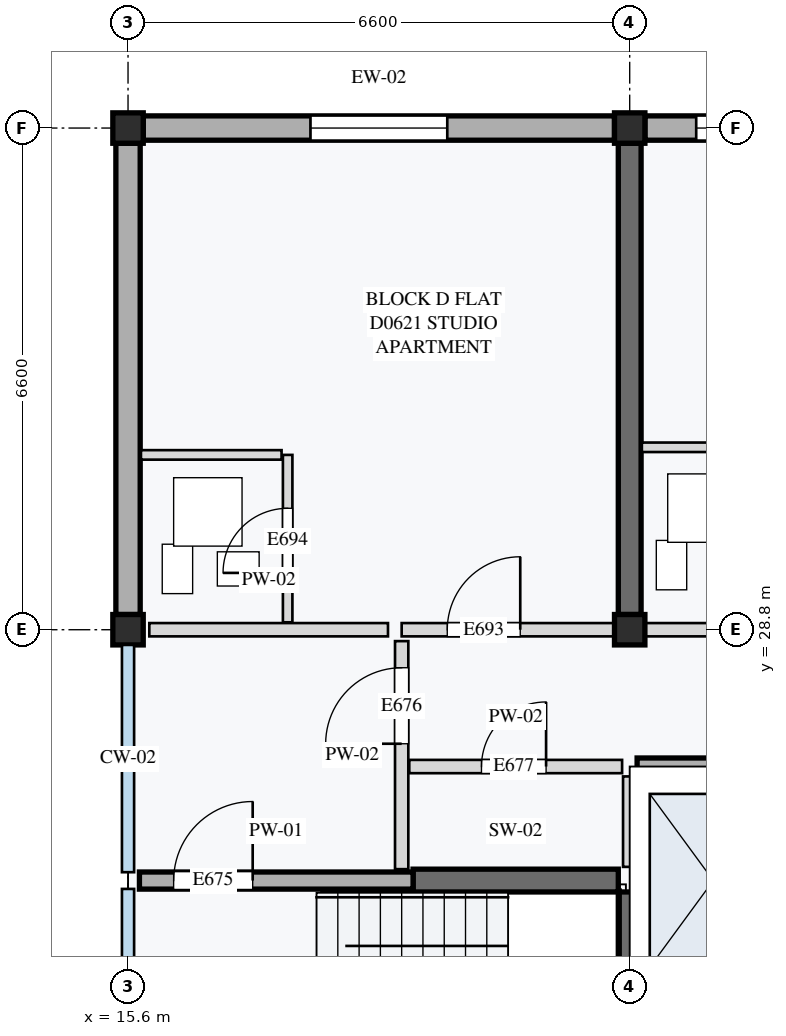
"""IFC4 building model, lengths in metres.
Left out: names, types, materials, properties, quantities, classifications, styles, units other than length and angle.
Written with IfcOpenShell. Run it as: python <this file> out.ifc"""

import sys

from ifc_helpers import new_model, si_unit, direction, frame, frame_2d, origin, origin_2d, place, context, subcontext, project, spatial, rectangle, extrude, element, fill, save


model = new_model("IFC4")
c1 = context("Model", 3, precision=1e-05, world=origin(), true_north=direction((0.0, 1.0)))
c2 = subcontext(c1, "Body", "Model", "MODEL_VIEW")
j1 = project(units=[si_unit("LENGTHUNIT", "METRE"), si_unit("PLANEANGLEUNIT", "RADIAN")], contexts=[c1])
p1 = place(None, origin())
s1 = spatial("IfcSite", under=j1, at=p1, CompositionType="ELEMENT")
p2 = place(p1, origin())
s2 = spatial("IfcBuilding", under=s1, at=p2, CompositionType="ELEMENT")
p3 = place(p2, frame((0.0, 0.0, 21.2)))
s3 = spatial("IfcBuildingStorey", under=s2, at=p3, CompositionType="ELEMENT", Elevation=21.2)
for number, where, z_axis, x_axis in (
    (1, (15.6, 28.8, 0.0), (0.0, 0.0, 1.0), (1.0, 0.0, 0.0)),
    (2, (15.6, 35.4, 0.0), (0.0, 0.0, 1.0), (1.0, 0.0, 0.0)),
    (3, (22.2, 28.8, 0.0), (0.0, 0.0, 1.0), (1.0, 0.0, 0.0)),
    (4, (22.2, 35.4, 0.0), (0.0, 0.0, 1.0), (1.0, 0.0, 0.0)),
):
    element("IfcColumn", number, at=place(p3, frame(where, z_axis=z_axis, x_axis=x_axis)), inside=s3, PredefinedType="COLUMN", context=c2, shape_type="SweptSolid", body=[
        extrude(rectangle(XDim=0.4, YDim=0.4, at=origin_2d()), origin(), (0.0, 0.0, 1.0), 3.2),
    ])
p4 = place(p3, frame((19.35, 25.5, 0.0), z_axis=(0.0, 0.0, 1.0), x_axis=(1.0, 0.0, 0.0)))
e5 = element("IfcWall", 5, at=p4, inside=s3, PredefinedType="SHEAR", context=c2, shape_type="SweptSolid", body=[
    extrude(rectangle(XDim=2.7, YDim=0.3, at=frame_2d((1.35, 0.0))), origin(), (0.0, 0.0, 1.0), 2.96),
])
p5 = place(p3, frame((22.2, 22.55, 0.0), z_axis=(0.0, 0.0, 1.0), x_axis=(0.0, 1.0, 0.0)))
e6 = element("IfcWall", 6, at=p5, inside=s3, PredefinedType="SHEAR", context=c2, shape_type="SweptSolid", body=[
    extrude(rectangle(XDim=2.8, YDim=0.3, at=frame_2d((1.4, 0.0))), origin(), (0.0, 0.0, 1.0), 2.96),
])
p6 = place(p3, frame((22.2, 29.0, 0.0), z_axis=(0.0, 0.0, 1.0), x_axis=(0.0, 1.0, 0.0)))
e7 = element("IfcWall", 7, at=p6, inside=s3, PredefinedType="SHEAR", context=c2, shape_type="SweptSolid", body=[
    extrude(rectangle(XDim=6.2, YDim=0.3, at=frame_2d((3.1, 0.0))), origin(), (0.0, 0.0, 1.0), 2.96),
])
p7 = place(p3, frame((15.8, 35.4, 0.0), z_axis=(0.0, 0.0, 1.0), x_axis=(1.0, 0.0, 0.0)))
e8 = element("IfcWall", 8, at=p7, inside=s3, PredefinedType="STANDARD", context=c2, shape_type="SweptSolid", body=[
    extrude(rectangle(XDim=6.2, YDim=0.32, at=frame_2d((3.1, 0.0))), origin(), (0.0, 0.0, 1.0), 2.6),
])
p8 = place(p7, frame((2.2, 0.0, 0.85)))
e9 = element("IfcOpeningElement", 9, at=p8, cuts=e8, PredefinedType="OPENING", context=c2, shape_type="SweptSolid", body=[
    extrude(rectangle(XDim=1.8, YDim=1.35, at=frame_2d((0.9, 0.675))), frame((0.0, 0.17, 0.0), z_axis=(0.0, -1.0, 0.0), x_axis=(1.0, 0.0, 0.0)), (0.0, 0.0, 1.0), 0.34),
])
p9 = place(p3, frame((22.4, 35.4, 0.0), z_axis=(0.0, 0.0, 1.0), x_axis=(1.0, 0.0, 0.0)))
e10 = element("IfcWall", 10, at=p9, inside=s3, PredefinedType="STANDARD", context=c2, shape_type="SweptSolid", body=[
    extrude(rectangle(XDim=6.2, YDim=0.32, at=frame_2d((3.1, 0.0))), origin(), (0.0, 0.0, 1.0), 2.6),
])
p10 = place(p9, frame((0.675, 0.0, 0.85)))
e11 = element("IfcOpeningElement", 11, at=p10, cuts=e10, PredefinedType="OPENING", context=c2, shape_type="SweptSolid", body=[
    extrude(rectangle(XDim=1.8, YDim=1.35, at=frame_2d((0.9, 0.675))), frame((0.0, 0.17, 0.0), z_axis=(0.0, -1.0, 0.0), x_axis=(1.0, 0.0, 0.0)), (0.0, 0.0, 1.0), 0.34),
])
p11 = place(p9, frame((4.1, 0.0, 0.85)))
e12 = element("IfcOpeningElement", 12, at=p11, cuts=e10, PredefinedType="OPENING", context=c2, shape_type="SweptSolid", body=[
    extrude(rectangle(XDim=1.5, YDim=1.35, at=frame_2d((0.75, 0.675))), frame((0.0, 0.17, 0.0), z_axis=(0.0, -1.0, 0.0), x_axis=(1.0, 0.0, 0.0)), (0.0, 0.0, 1.0), 0.34),
])
p12 = place(p3, frame((15.6, 29.0, 0.0), z_axis=(0.0, 0.0, 1.0), x_axis=(0.0, 1.0, 0.0)))
e13 = element("IfcWall", 13, at=p12, inside=s3, PredefinedType="STANDARD", context=c2, shape_type="SweptSolid", body=[
    extrude(rectangle(XDim=6.2, YDim=0.32, at=frame_2d((3.1, 0.0))), origin(), (0.0, 0.0, 1.0), 2.65),
])
p13 = place(p3, frame((15.75, 25.5, 0.0), z_axis=(0.0, 0.0, 1.0), x_axis=(1.0, 0.0, 0.0)))
e14 = element("IfcWall", 14, at=p13, inside=s3, PredefinedType="STANDARD", context=c2, shape_type="SweptSolid", body=[
    extrude(rectangle(XDim=3.6, YDim=0.225, at=frame_2d((1.8, 0.0))), origin(), (0.0, 0.0, 1.0), 2.96),
])
p14 = place(p13, frame((0.45, 0.0, 0.0)))
e15 = element("IfcOpeningElement", 15, at=p14, cuts=e14, PredefinedType="OPENING", context=c2, shape_type="SweptSolid", body=[
    extrude(rectangle(XDim=1.04, YDim=2.12, at=frame_2d((0.52, 1.06))), frame((0.0, 0.123, 0.0), z_axis=(0.0, -1.0, 0.0), x_axis=(1.0, 0.0, 0.0)), (0.0, 0.0, 1.0), 0.245),
])
p15 = place(p3, frame((19.2, 25.65, 0.0), z_axis=(0.0, 0.0, 1.0), x_axis=(0.0, 1.0, 0.0)))
e16 = element("IfcWall", 16, at=p15, inside=s3, PredefinedType="PARTITIONING", context=c2, shape_type="SweptSolid", body=[
    extrude(rectangle(XDim=3.0, YDim=0.175, at=frame_2d((1.5, 0.0))), origin(), (0.0, 0.0, 1.0), 2.96),
])
p16 = place(p15, frame((1.65, 0.0, 0.0)))
e17 = element("IfcOpeningElement", 17, at=p16, cuts=e16, PredefinedType="OPENING", context=c2, shape_type="SweptSolid", body=[
    extrude(rectangle(XDim=1.0, YDim=2.1, at=frame_2d((0.5, 1.05))), frame((0.0, 0.097, 0.0), z_axis=(0.0, -1.0, 0.0), x_axis=(1.0, 0.0, 0.0)), (0.0, 0.0, 1.0), 0.195),
])
p17 = place(p3, frame((19.3, 27.0, 0.0), z_axis=(0.0, 0.0, 1.0), x_axis=(1.0, 0.0, 0.0)))
e18 = element("IfcWall", 18, at=p17, inside=s3, PredefinedType="PARTITIONING", context=c2, shape_type="SweptSolid", body=[
    extrude(rectangle(XDim=2.8, YDim=0.175, at=frame_2d((1.4, 0.0))), origin(), (0.0, 0.0, 1.0), 2.96),
])
p18 = place(p17, frame((0.95, 0.0, 0.0)))
e19 = element("IfcOpeningElement", 19, at=p18, cuts=e18, PredefinedType="OPENING", context=c2, shape_type="SweptSolid", body=[
    extrude(rectangle(XDim=0.85, YDim=2.0, at=frame_2d((0.425, 1.0))), frame((0.0, 0.097, 0.0), z_axis=(0.0, -1.0, 0.0), x_axis=(1.0, 0.0, 0.0)), (0.0, 0.0, 1.0), 0.195),
])
p19 = place(p3, frame((22.2, 25.68, 0.0), z_axis=(0.0, 0.0, 1.0), x_axis=(0.0, 1.0, 0.0)))
e20 = element("IfcWall", 20, at=p19, inside=s3, PredefinedType="PARTITIONING", context=c2, shape_type="SweptSolid", body=[
    extrude(rectangle(XDim=1.19, YDim=0.175, at=frame_2d((0.595, 0.0))), origin(), (0.0, 0.0, 1.0), 2.96),
])
p20 = place(p3, frame((22.298, 27.0, 0.0), z_axis=(0.0, 0.0, 1.0), x_axis=(1.0, 0.0, 0.0)))
e21 = element("IfcWall", 21, at=p20, inside=s3, PredefinedType="STANDARD", context=c2, shape_type="SweptSolid", body=[
    extrude(rectangle(XDim=4.022, YDim=0.225, at=frame_2d((2.011, 0.0))), origin(), (0.0, 0.0, 1.0), 2.96),
])
p21 = place(p3, frame((15.88, 28.8, 0.0), z_axis=(0.0, 0.0, 1.0), x_axis=(1.0, 0.0, 0.0)))
e22 = element("IfcWall", 22, at=p21, inside=s3, PredefinedType="PARTITIONING", context=c2, shape_type="SweptSolid", body=[
    extrude(rectangle(XDim=3.14, YDim=0.175, at=frame_2d((1.57, 0.0))), origin(), (0.0, 0.0, 1.0), 2.55),
])
p22 = place(p3, frame((19.2, 28.8, 0.0), z_axis=(0.0, 0.0, 1.0), x_axis=(1.0, 0.0, 0.0)))
e23 = element("IfcWall", 23, at=p22, inside=s3, PredefinedType="PARTITIONING", context=c2, shape_type="SweptSolid", body=[
    extrude(rectangle(XDim=3.0, YDim=0.175, at=frame_2d((1.5, 0.0))), origin(), (0.0, 0.0, 1.0), 2.55),
])
p23 = place(p22, frame((0.6, 0.0, 0.0)))
e24 = element("IfcOpeningElement", 24, at=p23, cuts=e23, PredefinedType="OPENING", context=c2, shape_type="SweptSolid", body=[
    extrude(rectangle(XDim=0.96, YDim=2.18, at=frame_2d((0.48, 1.09))), frame((0.0, 0.097, 0.0), z_axis=(0.0, -1.0, 0.0), x_axis=(1.0, 0.0, 0.0)), (0.0, 0.0, 1.0), 0.195),
])
p24 = place(p3, frame((17.7, 28.897, 0.0), z_axis=(0.0, 0.0, 1.0), x_axis=(0.0, 1.0, 0.0)))
e25 = element("IfcWall", 25, at=p24, inside=s3, PredefinedType="PARTITIONING", context=c2, shape_type="SweptSolid", body=[
    extrude(rectangle(XDim=2.203, YDim=0.125, at=frame_2d((1.101, 0.0))), origin(), (0.0, 0.0, 1.0), 2.96),
])
p25 = place(p24, frame((0.65, 0.0, 0.0)))
e26 = element("IfcOpeningElement", 26, at=p25, cuts=e25, PredefinedType="OPENING", context=c2, shape_type="SweptSolid", body=[
    extrude(rectangle(XDim=0.85, YDim=2.04, at=frame_2d((0.425, 1.02))), frame((0.0, 0.073, 0.0), z_axis=(0.0, -1.0, 0.0), x_axis=(1.0, 0.0, 0.0)), (0.0, 0.0, 1.0), 0.145),
])
p26 = place(p3, frame((15.77, 31.1, 0.0), z_axis=(0.0, 0.0, 1.0), x_axis=(1.0, 0.0, 0.0)))
e27 = element("IfcWall", 27, at=p26, inside=s3, PredefinedType="PARTITIONING", context=c2, shape_type="SweptSolid", body=[
    extrude(rectangle(XDim=1.85, YDim=0.125, at=frame_2d((0.925, 0.0))), origin(), (0.0, 0.0, 1.0), 2.96),
])
p27 = place(p3, frame((22.2, 28.8, 0.0), z_axis=(0.0, 0.0, 1.0), x_axis=(1.0, 0.0, 0.0)))
e28 = element("IfcWall", 28, at=p27, inside=s3, PredefinedType="PARTITIONING", context=c2, shape_type="SweptSolid", body=[
    extrude(rectangle(XDim=6.6, YDim=0.175, at=frame_2d((3.3, 0.0))), origin(), (0.0, 0.0, 1.0), 2.55),
])
p28 = place(p27, frame((3.85, 0.0, 0.0)))
e29 = element("IfcOpeningElement", 29, at=p28, cuts=e28, PredefinedType="OPENING", context=c2, shape_type="SweptSolid", body=[
    extrude(rectangle(XDim=0.95, YDim=2.16, at=frame_2d((0.475, 1.08))), frame((0.0, 0.097, 0.0), z_axis=(0.0, -1.0, 0.0), x_axis=(1.0, 0.0, 0.0)), (0.0, 0.0, 1.0), 0.195),
])
p29 = place(p3, frame((22.36, 31.2, 0.0), z_axis=(0.0, 0.0, 1.0), x_axis=(1.0, 0.0, 0.0)))
e30 = element("IfcWall", 30, at=p29, inside=s3, PredefinedType="PARTITIONING", context=c2, shape_type="SweptSolid", body=[
    extrude(rectangle(XDim=1.66, YDim=0.125, at=frame_2d((0.83, 0.0))), origin(), (0.0, 0.0, 1.0), 2.96),
])
p30 = place(p8, origin())
e31 = element("IfcWindow", 31, at=p30, inside=s3, PartitioningType="SINGLE_PANEL", PredefinedType="WINDOW", context=c2, shape_type="SweptSolid", body=[
    extrude(rectangle(XDim=1.8, YDim=1.35, at=frame_2d((0.9, 0.675))), frame((0.0, 0.03, 0.0), z_axis=(0.0, -1.0, 0.0), x_axis=(1.0, 0.0, 0.0)), (0.0, 0.0, 1.0), 0.06),
])
fill(e9, e31)
p31 = place(p10, origin())
e32 = element("IfcWindow", 32, at=p31, inside=s3, PartitioningType="SINGLE_PANEL", PredefinedType="WINDOW", context=c2, shape_type="SweptSolid", body=[
    extrude(rectangle(XDim=1.8, YDim=1.35, at=frame_2d((0.9, 0.675))), frame((0.0, 0.03, 0.0), z_axis=(0.0, -1.0, 0.0), x_axis=(1.0, 0.0, 0.0)), (0.0, 0.0, 1.0), 0.06),
])
fill(e11, e32)
p32 = place(p14, origin())
e33 = element("IfcDoor", 33, at=p32, inside=s3, OperationType="SINGLE_SWING_RIGHT", PredefinedType="DOOR", context=c2, shape_type="SweptSolid", body=[
    extrude(rectangle(XDim=1.04, YDim=2.12, at=frame_2d((0.52, 1.06))), frame((0.0, 0.025, 0.0), z_axis=(0.0, -1.0, 0.0), x_axis=(1.0, 0.0, 0.0)), (0.0, 0.0, 1.0), 0.05),
])
fill(e15, e33)
p33 = place(p16, origin())
e34 = element("IfcDoor", 34, at=p33, inside=s3, OperationType="SINGLE_SWING_LEFT", PredefinedType="DOOR", context=c2, shape_type="SweptSolid", body=[
    extrude(rectangle(XDim=1.0, YDim=2.1, at=frame_2d((0.5, 1.05))), frame((0.0, 0.025, 0.0), z_axis=(0.0, -1.0, 0.0), x_axis=(1.0, 0.0, 0.0)), (0.0, 0.0, 1.0), 0.05),
])
fill(e17, e34)
p34 = place(p18, origin())
e35 = element("IfcDoor", 35, at=p34, inside=s3, OperationType="SINGLE_SWING_RIGHT", PredefinedType="DOOR", context=c2, shape_type="SweptSolid", body=[
    extrude(rectangle(XDim=0.85, YDim=2.0, at=frame_2d((0.425, 1.0))), frame((0.0, 0.025, 0.0), z_axis=(0.0, -1.0, 0.0), x_axis=(1.0, 0.0, 0.0)), (0.0, 0.0, 1.0), 0.05),
])
fill(e19, e35)
p35 = place(p23, origin())
e36 = element("IfcDoor", 36, at=p35, inside=s3, OperationType="SINGLE_SWING_RIGHT", PredefinedType="DOOR", context=c2, shape_type="SweptSolid", body=[
    extrude(rectangle(XDim=0.96, YDim=2.18, at=frame_2d((0.48, 1.09))), frame((0.0, 0.025, 0.0), z_axis=(0.0, -1.0, 0.0), x_axis=(1.0, 0.0, 0.0)), (0.0, 0.0, 1.0), 0.05),
])
fill(e24, e36)
p36 = place(p25, origin())
e37 = element("IfcDoor", 37, at=p36, inside=s3, OperationType="SINGLE_SWING_LEFT", PredefinedType="DOOR", context=c2, shape_type="SweptSolid", body=[
    extrude(rectangle(XDim=0.85, YDim=2.04, at=frame_2d((0.425, 1.02))), frame((0.0, 0.025, 0.0), z_axis=(0.0, -1.0, 0.0), x_axis=(1.0, 0.0, 0.0)), (0.0, 0.0, 1.0), 0.05),
])
fill(e26, e37)
save(model, sys.argv[1])
